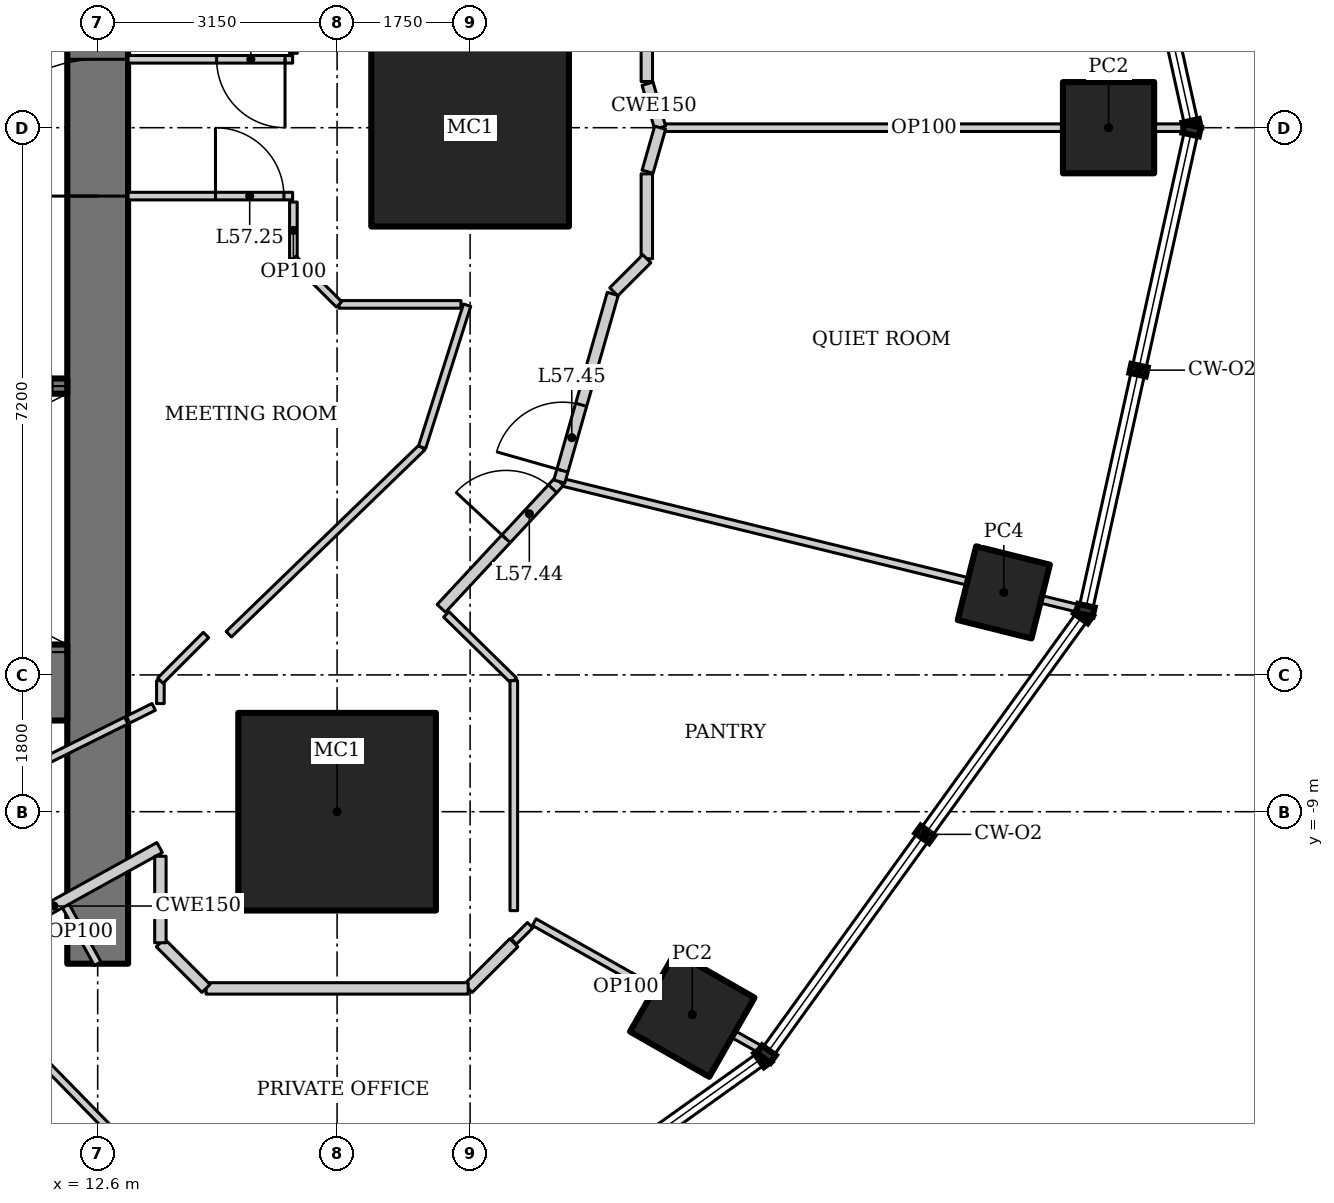
"""IFC4 building model, lengths in metres.
Left out: names, types, materials, properties, quantities, classifications, styles, units other than length and angle.
Written with IfcOpenShell. Run it as: python <this file> out.ifc"""

import sys

from ifc_helpers import new_model, si_unit, direction, frame, frame_2d, origin, origin_2d, place, context, subcontext, project, spatial, rectangle, hollow_rectangle, extrude, element, fill, save


model = new_model("IFC4")
c1 = context("Model", 3, precision=1e-05, world=origin(), true_north=direction((0.0, 1.0)))
c2 = subcontext(c1, "Body", "Model", "MODEL_VIEW")
j1 = project(units=[si_unit("LENGTHUNIT", "METRE"), si_unit("PLANEANGLEUNIT", "RADIAN")], contexts=[c1])
p1 = place(None, origin())
s1 = spatial("IfcSite", under=j1, at=p1, CompositionType="ELEMENT")
p2 = place(p1, origin())
s2 = spatial("IfcBuilding", under=s1, at=p2, CompositionType="ELEMENT")
p3 = place(p2, frame((0.0, 0.0, 245.2)))
s3 = spatial("IfcBuildingStorey", under=s2, at=p3, CompositionType="ELEMENT", Elevation=245.2)
for number, where, z_axis, x_axis in (
    (1, (17.5, 0.0, 0.0), (0.0, 0.0, 1.0), (1.0, 0.0, 0.0)),
    (2, (15.75, -9.0, 0.0), (0.0, 0.0, 1.0), (1.0, 0.0, 0.0)),
):
    element("IfcColumn", number, at=place(p3, frame(where, z_axis=z_axis, x_axis=x_axis)), inside=s3, PredefinedType="COLUMN", context=c2, shape_type="SweptSolid", body=[
        extrude(hollow_rectangle(XDim=2.6, YDim=2.6, WallThickness=0.13, at=origin_2d()), origin(), (0.0, 0.0, 1.0), 4.2),
    ])
for number, where, z_axis, x_axis in (
    (3, (25.9, 0.0, 0.0), (0.0, 0.0, 1.0), (1.0, 0.0, 0.0)),
    (4, (20.423, -11.67, 0.0), (0.0, 0.0, 1.0), (0.496, 0.868, 0.0)),
):
    element("IfcColumn", number, at=place(p3, frame(where, z_axis=z_axis, x_axis=x_axis)), inside=s3, PredefinedType="COLUMN", context=c2, shape_type="SweptSolid", body=[
        extrude(hollow_rectangle(XDim=1.2, YDim=1.2, WallThickness=0.1, at=origin_2d()), origin(), (0.0, 0.0, 1.0), 4.2),
    ])
p4 = place(p3, frame((24.522, -6.114, 0.0), z_axis=(0.0, 0.0, 1.0), x_axis=(0.2419218956, 0.970295726276, 0.0)))
e5 = element("IfcColumn", 5, at=p4, inside=s3, PredefinedType="COLUMN", context=c2, shape_type="SweptSolid", body=[
    extrude(hollow_rectangle(XDim=1.0, YDim=1.0, WallThickness=0.08, at=origin_2d()), origin(), (0.0, 0.0, 1.0), 4.2),
])
p5 = place(p3, frame((12.6, -11.0, 0.0), z_axis=(0.0, 0.0, 1.0), x_axis=(0.0, 1.0, 0.0)))
e6 = element("IfcWall", 6, at=p5, inside=s3, PredefinedType="SHEAR", context=c2, shape_type="SweptSolid", body=[
    extrude(rectangle(XDim=22.0, YDim=0.8, at=frame_2d((11.0, 0.0))), origin(), (0.0, 0.0, 1.0), 4.2),
])
p6 = place(p5, frame((10.1, 0.0, 0.0)))
e7 = element("IfcOpeningElement", 7, at=p6, cuts=e6, PredefinedType="OPENING", context=c2, shape_type="SweptSolid", body=[
    extrude(rectangle(XDim=1.8, YDim=2.1, at=frame_2d((0.9, 1.05))), frame((0.0, 0.41, 0.0), z_axis=(0.0, -1.0, 0.0), x_axis=(1.0, 0.0, 0.0)), (0.0, 0.0, 1.0), 0.82),
])
p7 = place(p3, frame((-12.2, -7.3, 0.0), z_axis=(0.0, 0.0, 1.0), x_axis=(1.0, 0.0, 0.0)))
e8 = element("IfcWall", 8, at=p7, inside=s3, PredefinedType="SHEAR", context=c2, shape_type="SweptSolid", body=[
    extrude(rectangle(XDim=24.4, YDim=1.0, at=frame_2d((12.2, 0.0))), origin(), (0.0, 0.0, 1.0), 4.2),
])
p8 = place(p3, frame((5.6, -3.4, 0.0), z_axis=(0.0, 0.0, 1.0), x_axis=(1.0, 0.0, 0.0)))
e9 = element("IfcWall", 9, at=p8, inside=s3, PredefinedType="SHEAR", context=c2, shape_type="SweptSolid", body=[
    extrude(rectangle(XDim=6.6, YDim=0.2, at=frame_2d((3.3, 0.0))), origin(), (0.0, 0.0, 1.0), 4.2),
])
p9 = place(p8, frame((5.2, 0.0, 0.0)))
e10 = element("IfcOpeningElement", 10, at=p9, cuts=e9, PredefinedType="OPENING", context=c2, shape_type="SweptSolid", body=[
    extrude(rectangle(XDim=1.2, YDim=2.1, at=frame_2d((0.6, 1.05))), frame((0.0, 0.11, 0.0), z_axis=(0.0, -1.0, 0.0), x_axis=(1.0, 0.0, 0.0)), (0.0, 0.0, 1.0), 0.22),
])
p10 = place(p3, frame((26.944, 0.0, 0.0), z_axis=(0.0, 0.0, 1.0), x_axis=(-1.0, 0.0, 0.0)))
e11 = element("IfcWall", 11, at=p10, inside=s3, PredefinedType="PARTITIONING", context=c2, shape_type="SweptSolid", body=[
    extrude(rectangle(XDim=6.944, YDim=0.1, at=frame_2d((3.472, 0.0))), origin(), (0.0, 0.0, 1.0), 3.349),
])
p11 = place(p3, frame((15.709, -16.199, 0.0), z_axis=(0.0, 0.0, 1.0), x_axis=(-0.699362525935, 0.714767135029, 0.0)))
e12 = element("IfcWall", 12, at=p11, inside=s3, PredefinedType="PARTITIONING", context=c2, shape_type="SweptSolid", body=[
    extrude(rectangle(XDim=7.259, YDim=0.1, at=frame_2d((3.629, 0.0))), origin(), (0.0, 0.0, 1.0), 3.41),
])
p12 = place(p3, frame((25.543, -6.335, 0.0), z_axis=(0.0, 0.0, 1.0), x_axis=(-0.971384494438, 0.237512450129, 0.0)))
e13 = element("IfcWall", 13, at=p12, inside=s3, PredefinedType="PARTITIONING", context=c2, shape_type="SweptSolid", body=[
    extrude(rectangle(XDim=7.072, YDim=0.1, at=frame_2d((3.536, 0.0))), origin(), (0.0, 0.0, 1.0), 3.108),
])
p13 = place(p3, frame((12.977, -7.8, 0.0), z_axis=(0.0, 0.0, 1.0), x_axis=(-0.895529831139, -0.445001484874, 0.0)))
e14 = element("IfcWall", 14, at=p13, inside=s3, PredefinedType="PARTITIONING", context=c2, shape_type="SweptSolid", body=[
    extrude(rectangle(XDim=4.108, YDim=0.1, at=frame_2d((2.054, 0.0))), origin(), (0.0, 0.0, 1.0), 4.05),
])
p14 = place(p13, frame((1.604, 0.0, 0.0)))
e15 = element("IfcOpeningElement", 15, at=p14, cuts=e14, PredefinedType="OPENING", context=c2, shape_type="SweptSolid", body=[
    extrude(rectangle(XDim=0.9, YDim=2.1, at=frame_2d((0.45, 1.05))), frame((0.0, 0.06, 0.0), z_axis=(0.0, -1.0, 0.0), x_axis=(1.0, 0.0, 0.0)), (0.0, 0.0, 1.0), 0.12),
])
p15 = place(p3, frame((13.337, -7.621, 0.0), z_axis=(0.0, 0.0, 1.0), x_axis=(-0.895721570004, -0.444615416995, 0.0)))
e16 = element("IfcWall", 16, at=p15, inside=s3, PredefinedType="PARTITIONING", context=c2, shape_type="SweptSolid", body=[
    extrude(rectangle(XDim=0.376, YDim=0.1, at=frame_2d((0.188, 0.0))), origin(), (0.0, 0.0, 1.0), 4.05),
])
p16 = place(p3, frame((12.6, -11.0, 0.0), z_axis=(0.0, 0.0, 1.0), x_axis=(-0.484103558985, 0.875010710893, 0.0)))
e17 = element("IfcWall", 17, at=p16, inside=s3, PredefinedType="PARTITIONING", context=c2, shape_type="SweptSolid", body=[
    extrude(rectangle(XDim=0.943, YDim=0.1, at=frame_2d((0.472, 0.0))), origin(), (0.0, 0.0, 1.0), 4.05),
])
p17 = place(p3, frame((21.358, -12.15, 0.0), z_axis=(0.0, 0.0, 1.0), x_axis=(-0.871494482514, 0.49040530885, 0.0)))
e18 = element("IfcWall", 18, at=p17, inside=s3, PredefinedType="PARTITIONING", context=c2, shape_type="SweptSolid", body=[
    extrude(rectangle(XDim=3.459, YDim=0.1, at=frame_2d((1.73, 0.0))), origin(), (0.0, 0.0, 1.0), 3.522),
])
p18 = place(p3, frame((10.633, -11.01, 0.0), z_axis=(0.0, 0.0, 1.0), x_axis=(0.875072100837, 0.483992580869, 0.0)))
e19 = element("IfcWall", 19, at=p18, inside=s3, PredefinedType="PARTITIONING", context=c2, shape_type="SweptSolid", body=[
    extrude(rectangle(XDim=3.179, YDim=0.15, at=frame_2d((1.59, 0.0))), origin(), (0.0, 0.0, 1.0), 4.05),
])
p19 = place(p18, frame((0.15, 0.0, 0.0)))
e20 = element("IfcOpeningElement", 20, at=p19, cuts=e19, PredefinedType="OPENING", context=c2, shape_type="SweptSolid", body=[
    extrude(rectangle(XDim=0.9, YDim=2.1, at=frame_2d((0.45, 1.05))), frame((0.0, 0.085, 0.0), z_axis=(0.0, -1.0, 0.0), x_axis=(1.0, 0.0, 0.0)), (0.0, 0.0, 1.0), 0.17),
])
p20 = place(p3, frame((17.121, -6.325, 0.0), z_axis=(0.0, 0.0, 1.0), x_axis=(0.680985069419, 0.732297299755, 0.0)))
e21 = element("IfcWall", 21, at=p20, inside=s3, PredefinedType="PARTITIONING", context=c2, shape_type="SweptSolid", body=[
    extrude(rectangle(XDim=2.279, YDim=0.15, at=frame_2d((1.14, 0.0))), origin(), (0.0, 0.0, 1.0), 4.05),
])
p21 = place(p20, frame((1.25, 0.0, 0.0)))
e22 = element("IfcOpeningElement", 22, at=p21, cuts=e21, PredefinedType="OPENING", context=c2, shape_type="SweptSolid", body=[
    extrude(rectangle(XDim=0.9, YDim=2.1, at=frame_2d((0.45, 1.05))), frame((0.0, 0.085, 0.0), z_axis=(0.0, -1.0, 0.0), x_axis=(1.0, 0.0, 0.0)), (0.0, 0.0, 1.0), 0.17),
])
p22 = place(p3, frame((16.868, -4.206, 0.0), z_axis=(0.0, 0.0, 1.0), x_axis=(-0.718810161381, -0.695206409562, 0.0)))
e23 = element("IfcWall", 23, at=p22, inside=s3, PredefinedType="PARTITIONING", context=c2, shape_type="SweptSolid", body=[
    extrude(rectangle(XDim=3.537, YDim=0.1, at=frame_2d((1.769, 0.0))), origin(), (0.0, 0.0, 1.0), 4.05),
])
p23 = place(p3, frame((13.425, -7.578, 0.0), z_axis=(0.0, 0.0, 1.0), x_axis=(0.0, 1.0, 0.0)))
e24 = element("IfcWall", 24, at=p23, inside=s3, PredefinedType="PARTITIONING", context=c2, shape_type="SweptSolid", body=[
    extrude(rectangle(XDim=0.302, YDim=0.1, at=frame_2d((0.151, 0.0))), origin(), (0.0, 0.0, 1.0), 4.05),
])
p24 = place(p3, frame((13.425, -7.275, 0.0), z_axis=(0.0, 0.0, 1.0), x_axis=(0.707106781187, 0.707106781187, 0.0)))
e25 = element("IfcWall", 25, at=p24, inside=s3, PredefinedType="PARTITIONING", context=c2, shape_type="SweptSolid", body=[
    extrude(rectangle(XDim=0.849, YDim=0.1, at=frame_2d((0.425, 0.0))), origin(), (0.0, 0.0, 1.0), 4.05),
])
p25 = place(p3, frame((18.075, -10.725, 0.0), z_axis=(0.0, 0.0, 1.0), x_axis=(-0.707106781187, -0.707106781187, 0.0)))
e26 = element("IfcWall", 26, at=p25, inside=s3, PredefinedType="PARTITIONING", context=c2, shape_type="SweptSolid", body=[
    extrude(rectangle(XDim=0.849, YDim=0.15, at=frame_2d((0.425, 0.0))), origin(), (0.0, 0.0, 1.0), 4.05),
])
p26 = place(p3, frame((17.475, -11.325, 0.0), z_axis=(0.0, 0.0, 1.0), x_axis=(-1.0, 0.0, 0.0)))
e27 = element("IfcWall", 27, at=p26, inside=s3, PredefinedType="PARTITIONING", context=c2, shape_type="SweptSolid", body=[
    extrude(rectangle(XDim=3.449, YDim=0.15, at=frame_2d((1.725, 0.0))), origin(), (0.0, 0.0, 1.0), 4.05),
])
p27 = place(p3, frame((14.025, -11.325, 0.0), z_axis=(0.0, 0.0, 1.0), x_axis=(-0.707106781187, 0.707106781187, 0.0)))
e28 = element("IfcWall", 28, at=p27, inside=s3, PredefinedType="PARTITIONING", context=c2, shape_type="SweptSolid", body=[
    extrude(rectangle(XDim=0.849, YDim=0.15, at=frame_2d((0.425, 0.0))), origin(), (0.0, 0.0, 1.0), 4.05),
])
p28 = place(p3, frame((13.425, -10.725, 0.0), z_axis=(0.0, 0.0, 1.0), x_axis=(0.0, 1.0, 0.0)))
e29 = element("IfcWall", 29, at=p28, inside=s3, PredefinedType="PARTITIONING", context=c2, shape_type="SweptSolid", body=[
    extrude(rectangle(XDim=1.138, YDim=0.15, at=frame_2d((0.569, 0.0))), origin(), (0.0, 0.0, 1.0), 4.05),
])
p29 = place(p3, frame((18.289, -10.493, 0.0), z_axis=(0.0, 0.0, 1.0), x_axis=(-0.707509576179, -0.706703756616, 0.0)))
e30 = element("IfcWall", 30, at=p29, inside=s3, PredefinedType="PARTITIONING", context=c2, shape_type="SweptSolid", body=[
    extrude(rectangle(XDim=0.303, YDim=0.1, at=frame_2d((0.151, 0.0))), origin(), (0.0, 0.0, 1.0), 4.05),
])
p30 = place(p3, frame((17.187, -6.404, 0.0), z_axis=(0.0, 0.0, 1.0), x_axis=(0.713842064016, -0.700306723973, 0.0)))
e31 = element("IfcWall", 31, at=p30, inside=s3, PredefinedType="PARTITIONING", context=c2, shape_type="SweptSolid", body=[
    extrude(rectangle(XDim=1.245, YDim=0.1, at=frame_2d((0.622, 0.0))), origin(), (0.0, 0.0, 1.0), 4.05),
])
p31 = place(p3, frame((18.075, -7.275, 0.0), z_axis=(0.0, 0.0, 1.0), x_axis=(0.0, -1.0, 0.0)))
e32 = element("IfcWall", 32, at=p31, inside=s3, PredefinedType="PARTITIONING", context=c2, shape_type="SweptSolid", body=[
    extrude(rectangle(XDim=3.027, YDim=0.1, at=frame_2d((1.513, 0.0))), origin(), (0.0, 0.0, 1.0), 3.601),
])
p32 = place(p3, frame((20.0, 0.0, 0.0), z_axis=(0.0, 0.0, 1.0), x_axis=(-0.27407847996, 0.961707329089, 0.0)))
e33 = element("IfcWall", 33, at=p32, inside=s3, PredefinedType="PARTITIONING", context=c2, shape_type="SweptSolid", body=[
    extrude(rectangle(XDim=0.602, YDim=0.15, at=frame_2d((0.301, 0.0))), origin(), (0.0, 0.0, 1.0), 4.05),
])
p33 = place(p3, frame((18.673, -4.656, 0.0), z_axis=(0.0, 0.0, 1.0), x_axis=(0.274067949327, 0.961710330168, 0.0)))
e34 = element("IfcWall", 34, at=p33, inside=s3, PredefinedType="PARTITIONING", context=c2, shape_type="SweptSolid", body=[
    extrude(rectangle(XDim=2.567, YDim=0.15, at=frame_2d((1.284, 0.0))), origin(), (0.0, 0.0, 1.0), 4.05),
])
p34 = place(p33, frame((0.15, 0.0, 0.0)))
e35 = element("IfcOpeningElement", 35, at=p34, cuts=e34, PredefinedType="OPENING", context=c2, shape_type="SweptSolid", body=[
    extrude(rectangle(XDim=0.9, YDim=2.1, at=frame_2d((0.45, 1.05))), frame((0.0, 0.085, 0.0), z_axis=(0.0, -1.0, 0.0), x_axis=(1.0, 0.0, 0.0)), (0.0, 0.0, 1.0), 0.17),
])
p35 = place(p3, frame((19.835, -0.579, 0.0), z_axis=(0.0, 0.0, 1.0), x_axis=(0.27407847996, 0.961707329089, 0.0)))
e36 = element("IfcWall", 36, at=p35, inside=s3, PredefinedType="PARTITIONING", context=c2, shape_type="SweptSolid", body=[
    extrude(rectangle(XDim=0.602, YDim=0.15, at=frame_2d((0.301, 0.0))), origin(), (0.0, 0.0, 1.0), 4.05),
])
p36 = place(p3, frame((13.0, -0.9, 0.0), z_axis=(0.0, 0.0, 1.0), x_axis=(1.0, 0.0, 0.0)))
e37 = element("IfcWall", 37, at=p36, inside=s3, PredefinedType="PARTITIONING", context=c2, shape_type="SweptSolid", body=[
    extrude(rectangle(XDim=2.165, YDim=0.1, at=frame_2d((1.083, 0.0))), origin(), (0.0, 0.0, 1.0), 4.05),
])
p37 = place(p36, frame((1.15, 0.0, 0.0)))
e38 = element("IfcOpeningElement", 38, at=p37, cuts=e37, PredefinedType="OPENING", context=c2, shape_type="SweptSolid", body=[
    extrude(rectangle(XDim=0.9, YDim=2.1, at=frame_2d((0.45, 1.05))), frame((0.0, 0.06, 0.0), z_axis=(0.0, -1.0, 0.0), x_axis=(1.0, 0.0, 0.0)), (0.0, 0.0, 1.0), 0.12),
])
p38 = place(p3, frame((17.46, -2.335, 0.0), z_axis=(0.0, 0.0, 1.0), x_axis=(-0.301821975729, -0.953364303384, 0.0)))
e39 = element("IfcWall", 39, at=p38, inside=s3, PredefinedType="PARTITIONING", context=c2, shape_type="SweptSolid", body=[
    extrude(rectangle(XDim=1.962, YDim=0.1, at=frame_2d((0.981, 0.0))), origin(), (0.0, 0.0, 1.0), 4.05),
])
p39 = place(p3, frame((15.165, 0.9, 0.0), z_axis=(0.0, 0.0, 1.0), x_axis=(-1.0, 0.0, 0.0)))
e40 = element("IfcWall", 40, at=p39, inside=s3, PredefinedType="PARTITIONING", context=c2, shape_type="SweptSolid", body=[
    extrude(rectangle(XDim=2.165, YDim=0.1, at=frame_2d((1.083, 0.0))), origin(), (0.0, 0.0, 1.0), 4.05),
])
p40 = place(p39, frame((0.1, 0.0, 0.0)))
e41 = element("IfcOpeningElement", 41, at=p40, cuts=e40, PredefinedType="OPENING", context=c2, shape_type="SweptSolid", body=[
    extrude(rectangle(XDim=0.9, YDim=2.1, at=frame_2d((0.45, 1.05))), frame((0.0, 0.06, 0.0), z_axis=(0.0, -1.0, 0.0), x_axis=(1.0, 0.0, 0.0)), (0.0, 0.0, 1.0), 0.12),
])
p41 = place(p3, frame((15.175, -1.725, 0.0), z_axis=(0.0, 0.0, 1.0), x_axis=(0.0, 1.0, 0.0)))
e42 = element("IfcWall", 42, at=p41, inside=s3, PredefinedType="PARTITIONING", context=c2, shape_type="SweptSolid", body=[
    extrude(rectangle(XDim=0.746, YDim=0.1, at=frame_2d((0.373, 0.0))), origin(), (0.0, 0.0, 1.0), 4.05),
])
p42 = place(p3, frame((17.38, -2.325, 0.0), z_axis=(0.0, 0.0, 1.0), x_axis=(-1.0, 0.0, 0.0)))
e43 = element("IfcWall", 43, at=p42, inside=s3, PredefinedType="PARTITIONING", context=c2, shape_type="SweptSolid", body=[
    extrude(rectangle(XDim=1.604, YDim=0.1, at=frame_2d((0.802, 0.0))), origin(), (0.0, 0.0, 1.0), 4.05),
])
p43 = place(p3, frame((15.775, -2.325, 0.0), z_axis=(0.0, 0.0, 1.0), x_axis=(-0.707106781187, 0.707106781187, 0.0)))
e44 = element("IfcWall", 44, at=p43, inside=s3, PredefinedType="PARTITIONING", context=c2, shape_type="SweptSolid", body=[
    extrude(rectangle(XDim=0.849, YDim=0.1, at=frame_2d((0.425, 0.0))), origin(), (0.0, 0.0, 1.0), 4.05),
])
p44 = place(p3, frame((15.175, 0.978, 0.0), z_axis=(0.0, 0.0, 1.0), x_axis=(0.0, 1.0, 0.0)))
e45 = element("IfcWall", 45, at=p44, inside=s3, PredefinedType="PARTITIONING", context=c2, shape_type="SweptSolid", body=[
    extrude(rectangle(XDim=0.746, YDim=0.1, at=frame_2d((0.373, 0.0))), origin(), (0.0, 0.0, 1.0), 4.05),
])
for number, where, z_axis, x_axis in (
    (46, (19.825, 1.725, 0.0), (0.0, 0.0, 1.0), (0.0, -1.0, 0.0)),
    (47, (19.825, -0.607, 0.0), (0.0, 0.0, 1.0), (0.0, -1.0, 0.0)),
):
    element("IfcWall", number, at=place(p3, frame(where, z_axis=z_axis, x_axis=x_axis)), inside=s3, PredefinedType="PARTITIONING", context=c2, shape_type="SweptSolid", body=[
        extrude(rectangle(XDim=1.117, YDim=0.15, at=frame_2d((0.559, 0.0))), origin(), (0.0, 0.0, 1.0), 4.05),
    ])
p45 = place(p3, frame((19.825, -1.725, 0.0), z_axis=(0.0, 0.0, 1.0), x_axis=(-0.707106781187, -0.707106781187, 0.0)))
e48 = element("IfcWall", 48, at=p45, inside=s3, PredefinedType="PARTITIONING", context=c2, shape_type="SweptSolid", body=[
    extrude(rectangle(XDim=0.615, YDim=0.15, at=frame_2d((0.308, 0.0))), origin(), (0.0, 0.0, 1.0), 4.05),
])
p46 = place(p9, origin())
e49 = element("IfcDoor", 49, at=p46, inside=s3, OperationType="SINGLE_SWING_RIGHT", PredefinedType="DOOR", context=c2, shape_type="SweptSolid", body=[
    extrude(rectangle(XDim=1.2, YDim=2.1, at=frame_2d((0.6, 1.05))), frame((0.0, 0.025, 0.0), z_axis=(0.0, -1.0, 0.0), x_axis=(1.0, 0.0, 0.0)), (0.0, 0.0, 1.0), 0.05),
])
fill(e10, e49)
p47 = place(p6, origin())
e50 = element("IfcDoor", 50, at=p47, inside=s3, OperationType="DOUBLE_DOOR_DOUBLE_SWING", PredefinedType="DOOR", context=c2, shape_type="SweptSolid", body=[
    extrude(rectangle(XDim=1.8, YDim=2.1, at=frame_2d((0.9, 1.05))), frame((0.0, 0.025, 0.0), z_axis=(0.0, -1.0, 0.0), x_axis=(1.0, 0.0, 0.0)), (0.0, 0.0, 1.0), 0.05),
])
fill(e7, e50)
p48 = place(p37, origin())
e51 = element("IfcDoor", 51, at=p48, inside=s3, OperationType="SINGLE_SWING_LEFT", PredefinedType="DOOR", context=c2, shape_type="SweptSolid", body=[
    extrude(rectangle(XDim=0.9, YDim=2.1, at=frame_2d((0.45, 1.05))), frame((0.0, 0.025, 0.0), z_axis=(0.0, -1.0, 0.0), x_axis=(1.0, 0.0, 0.0)), (0.0, 0.0, 1.0), 0.05),
])
fill(e38, e51)
p49 = place(p40, origin())
e52 = element("IfcDoor", 52, at=p49, inside=s3, OperationType="SINGLE_SWING_LEFT", PredefinedType="DOOR", context=c2, shape_type="SweptSolid", body=[
    extrude(rectangle(XDim=0.9, YDim=2.1, at=frame_2d((0.45, 1.05))), frame((0.0, 0.025, 0.0), z_axis=(0.0, -1.0, 0.0), x_axis=(1.0, 0.0, 0.0)), (0.0, 0.0, 1.0), 0.05),
])
fill(e41, e52)
p50 = place(p21, origin())
e53 = element("IfcDoor", 53, at=p50, inside=s3, OperationType="SINGLE_SWING_LEFT", PredefinedType="DOOR", context=c2, shape_type="SweptSolid", body=[
    extrude(rectangle(XDim=0.9, YDim=2.1, at=frame_2d((0.45, 1.05))), frame((0.0, 0.025, 0.0), z_axis=(0.0, -1.0, 0.0), x_axis=(1.0, 0.0, 0.0)), (0.0, 0.0, 1.0), 0.05),
])
fill(e22, e53)
p51 = place(p34, origin())
e54 = element("IfcDoor", 54, at=p51, inside=s3, OperationType="SINGLE_SWING_LEFT", PredefinedType="DOOR", context=c2, shape_type="SweptSolid", body=[
    extrude(rectangle(XDim=0.9, YDim=2.1, at=frame_2d((0.45, 1.05))), frame((0.0, 0.025, 0.0), z_axis=(0.0, -1.0, 0.0), x_axis=(1.0, 0.0, 0.0)), (0.0, 0.0, 1.0), 0.05),
])
fill(e35, e54)
save(model, sys.argv[1])
